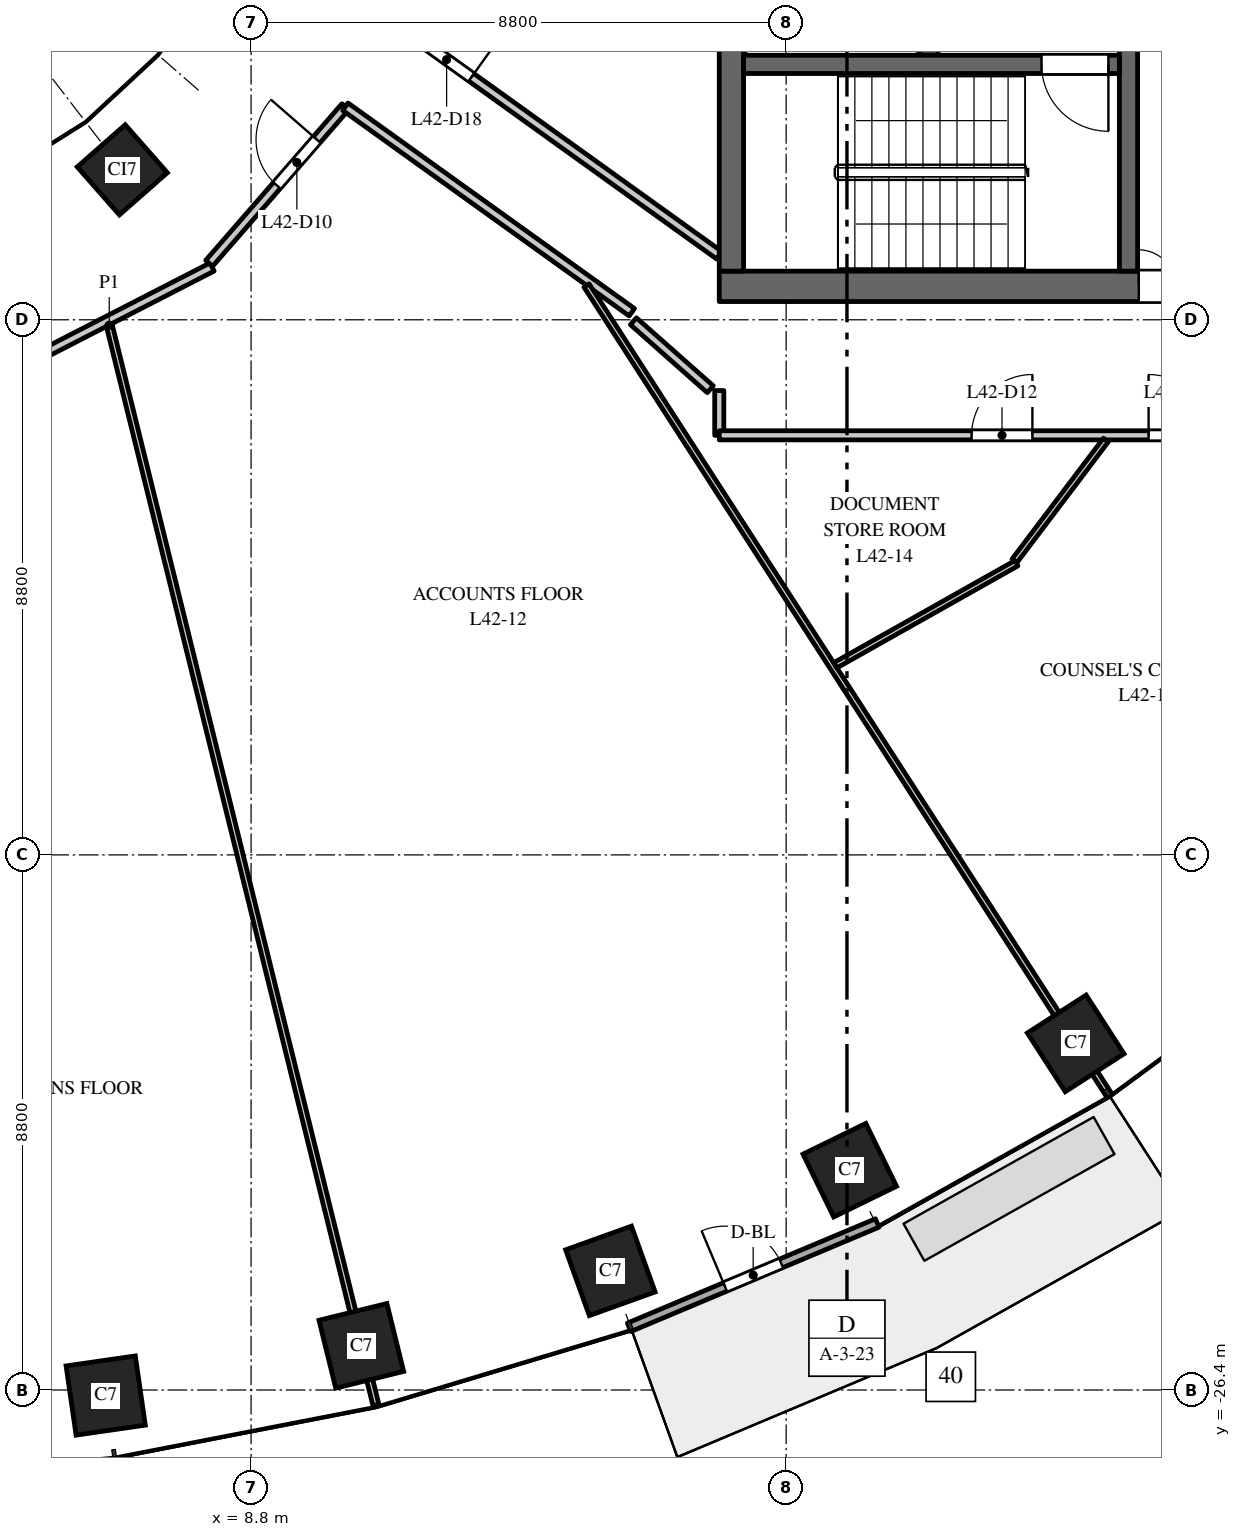
"""IFC4 building model, lengths in metres.
Left out: names, types, materials, properties, quantities, classifications, styles, units other than length and angle.
Written with IfcOpenShell. Run it as: python <this file> out.ifc"""

import sys

from ifc_helpers import new_model, si_unit, direction, frame, frame_2d, origin, origin_2d, place, context, subcontext, project, spatial, rectangle, extrude, element, fill, save


model = new_model("IFC4")
c1 = context("Model", 3, precision=1e-05, world=origin(), true_north=direction((0.0, 1.0)))
c2 = subcontext(c1, "Body", "Model", "MODEL_VIEW")
j1 = project(units=[si_unit("LENGTHUNIT", "METRE"), si_unit("PLANEANGLEUNIT", "RADIAN")], contexts=[c1])
p1 = place(None, origin())
s1 = spatial("IfcSite", under=j1, at=p1, CompositionType="ELEMENT")
p2 = place(p1, origin())
s2 = spatial("IfcBuilding", under=s1, at=p2, CompositionType="ELEMENT")
p3 = place(p2, frame((0.0, 0.0, 182.0)))
s3 = spatial("IfcBuildingStorey", under=s2, at=p3, CompositionType="ELEMENT", Elevation=182.0)
for number, where, z_axis, x_axis in (
    (1, (6.409, -26.491, 0.0), (0.0, 0.0, 1.0), (0.99, 0.143, 0.0)),
    (2, (10.613, -25.674, 0.0), (0.0, 0.0, 1.0), (0.971, 0.24, 0.0)),
    (3, (14.709, -24.441, 0.0), (0.0, 0.0, 1.0), (0.941, 0.338, 0.0)),
    (4, (18.646, -22.785, 0.0), (0.0, 0.0, 1.0), (0.898, 0.439, 0.0)),
    (5, (22.362, -20.7, 0.0), (0.0, 0.0, 1.0), (0.84, 0.542, 0.0)),
):
    element("IfcColumn", number, at=place(p3, frame(where, z_axis=z_axis, x_axis=x_axis)), inside=s3, PredefinedType="COLUMN", context=c2, shape_type="SweptSolid", body=[
        extrude(rectangle(XDim=1.15, YDim=1.15, at=origin_2d()), origin(), (0.0, 0.0, 1.0), 4.0),
    ])
p4 = place(p3, frame((6.682, -6.334, 0.0), z_axis=(0.0, 0.0, 1.0), x_axis=(0.75102249095, 0.660276622399, 0.0)))
e6 = element("IfcColumn", 6, at=p4, inside=s3, PredefinedType="COLUMN", context=c2, shape_type="SweptSolid", body=[
    extrude(rectangle(XDim=1.05, YDim=1.05, at=origin_2d()), origin(), (0.0, 0.0, 1.0), 4.0),
])
p5 = place(p3, frame((16.5, -8.25, 0.0), z_axis=(0.0, 0.0, 1.0), x_axis=(1.0, 0.0, 0.0)))
e7 = element("IfcWall", 7, at=p5, inside=s3, PredefinedType="SHEAR", context=c2, shape_type="SweptSolid", body=[
    extrude(rectangle(XDim=15.0, YDim=0.5, at=frame_2d((7.5, 0.0))), origin(), (0.0, 0.0, 1.0), 3.7),
])
p6 = place(p5, frame((6.9, 0.0, 0.0)))
e8 = element("IfcOpeningElement", 8, at=p6, cuts=e7, PredefinedType="OPENING", context=c2, shape_type="SweptSolid", body=[
    extrude(rectangle(XDim=1.2, YDim=2.1, at=frame_2d((0.6, 1.05))), frame((0.0, 0.26, 0.0), z_axis=(0.0, -1.0, 0.0), x_axis=(1.0, 0.0, 0.0)), (0.0, 0.0, 1.0), 0.52),
])
p7 = place(p5, frame((12.95, 0.0, 0.0)))
e9 = element("IfcOpeningElement", 9, at=p7, cuts=e7, PredefinedType="OPENING", context=c2, shape_type="SweptSolid", body=[
    extrude(rectangle(XDim=0.9, YDim=2.1, at=frame_2d((0.45, 1.05))), frame((0.0, 0.26, 0.0), z_axis=(0.0, -1.0, 0.0), x_axis=(1.0, 0.0, 0.0)), (0.0, 0.0, 1.0), 0.52),
])
p8 = place(p3, frame((19.95, -4.45, 0.0), z_axis=(0.0, 0.0, 1.0), x_axis=(0.0, 1.0, 0.0)))
e10 = element("IfcWall", 10, at=p8, inside=s3, PredefinedType="SHEAR", context=c2, shape_type="SweptSolid", body=[
    extrude(rectangle(XDim=8.9, YDim=0.3, at=frame_2d((4.45, 0.0))), origin(), (0.0, 0.0, 1.0), 3.7),
])
p9 = place(p8, frame((0.775, 0.0, 0.0)))
e11 = element("IfcOpeningElement", 11, at=p9, cuts=e10, PredefinedType="OPENING", context=c2, shape_type="SweptSolid", body=[
    extrude(rectangle(XDim=1.2, YDim=2.1, at=frame_2d((0.6, 1.05))), frame((0.0, 0.16, 0.0), z_axis=(0.0, -1.0, 0.0), x_axis=(1.0, 0.0, 0.0)), (0.0, 0.0, 1.0), 0.32),
])
p10 = place(p8, frame((4.675, 0.0, 0.0)))
e12 = element("IfcOpeningElement", 12, at=p10, cuts=e10, PredefinedType="OPENING", context=c2, shape_type="SweptSolid", body=[
    extrude(rectangle(XDim=1.1, YDim=2.1, at=frame_2d((0.55, 1.05))), frame((0.0, 0.16, 0.0), z_axis=(0.0, -1.0, 0.0), x_axis=(1.0, 0.0, 0.0)), (0.0, 0.0, 1.0), 0.32),
])
p11 = place(p8, frame((7.25, 0.0, 0.0)))
e13 = element("IfcOpeningElement", 13, at=p11, cuts=e10, PredefinedType="OPENING", context=c2, shape_type="SweptSolid", body=[
    extrude(rectangle(XDim=1.1, YDim=2.1, at=frame_2d((0.55, 1.05))), frame((0.0, 0.16, 0.0), z_axis=(0.0, -1.0, 0.0), x_axis=(1.0, 0.0, 0.0)), (0.0, 0.0, 1.0), 0.32),
])
p12 = place(p3, frame((16.7, -8.0, 0.0), z_axis=(0.0, 0.0, 1.0), x_axis=(0.0, 1.0, 0.0)))
e14 = element("IfcWall", 14, at=p12, inside=s3, PredefinedType="SHEAR", context=c2, shape_type="SweptSolid", body=[
    extrude(rectangle(XDim=16.0, YDim=0.4, at=frame_2d((8.0, 0.0))), origin(), (0.0, 0.0, 1.0), 3.7),
])
p13 = place(p3, frame((23.23, -8.0, 0.0), z_axis=(0.0, 0.0, 1.0), x_axis=(0.0, 1.0, 0.0)))
e15 = element("IfcWall", 15, at=p13, inside=s3, PredefinedType="SHEAR", context=c2, shape_type="SweptSolid", body=[
    extrude(rectangle(XDim=7.875, YDim=0.3, at=frame_2d((3.938, 0.0))), origin(), (0.0, 0.0, 1.0), 3.7),
])
p14 = place(p13, frame((5.15, 0.0, 0.0)))
e16 = element("IfcOpeningElement", 16, at=p14, cuts=e15, PredefinedType="OPENING", context=c2, shape_type="SweptSolid", body=[
    extrude(rectangle(XDim=1.1, YDim=2.1, at=frame_2d((0.55, 1.05))), frame((0.0, 0.16, 0.0), z_axis=(0.0, -1.0, 0.0), x_axis=(1.0, 0.0, 0.0)), (0.0, 0.0, 1.0), 0.32),
])
p15 = place(p3, frame((16.9, -4.6, 0.0), z_axis=(0.0, 0.0, 1.0), x_axis=(1.0, 0.0, 0.0)))
e17 = element("IfcWall", 17, at=p15, inside=s3, PredefinedType="SHEAR", context=c2, shape_type="SweptSolid", body=[
    extrude(rectangle(XDim=6.18, YDim=0.3, at=frame_2d((3.09, 0.0))), origin(), (0.0, 0.0, 1.0), 3.7),
])
p16 = place(p15, frame((4.9, 0.0, 0.0)))
e18 = element("IfcOpeningElement", 18, at=p16, cuts=e17, PredefinedType="OPENING", context=c2, shape_type="SweptSolid", body=[
    extrude(rectangle(XDim=1.1, YDim=2.1, at=frame_2d((0.55, 1.05))), frame((0.0, 0.16, 0.0), z_axis=(0.0, -1.0, 0.0), x_axis=(1.0, 0.0, 0.0)), (0.0, 0.0, 1.0), 0.32),
])
p17 = place(p3, frame((15.018, -25.369, 0.0), z_axis=(0.0, 0.0, 1.0), x_axis=(0.921816985161, 0.387625393736, 0.0)))
e19 = element("IfcWall", 19, at=p17, inside=s3, PredefinedType="STANDARD", context=c2, shape_type="SweptSolid", body=[
    extrude(rectangle(XDim=4.426, YDim=0.15, at=frame_2d((2.213, 0.0))), origin(), (0.0, 0.0, 1.0), 3.7),
])
p18 = place(p17, frame((1.713, 0.0, 0.0)))
e20 = element("IfcOpeningElement", 20, at=p18, cuts=e19, PredefinedType="OPENING", context=c2, shape_type="SweptSolid", body=[
    extrude(rectangle(XDim=1.0, YDim=2.4, at=frame_2d((0.5, 1.2))), frame((0.0, 0.085, 0.0), z_axis=(0.0, -1.0, 0.0), x_axis=(1.0, 0.0, 0.0)), (0.0, 0.0, 1.0), 0.17),
])
p19 = place(p3, frame((4.337, -9.896, 0.0), z_axis=(0.0, 0.0, 1.0), x_axis=(0.889382211946, 0.457164391739, 0.0)))
e21 = element("IfcWall", 21, at=p19, inside=s3, PredefinedType="PARTITIONING", context=c2, shape_type="SweptSolid", body=[
    extrude(rectangle(XDim=4.296, YDim=0.15, at=frame_2d((2.148, 0.0))), origin(), (0.0, 0.0, 1.0), 2.85),
])
p20 = place(p3, frame((6.467, -8.889, 0.0), z_axis=(0.0, 0.0, 1.0), x_axis=(0.239792865419, -0.970824073504, 0.0)))
e22 = element("IfcWall", 22, at=p20, inside=s3, PredefinedType="PARTITIONING", context=c2, shape_type="SweptSolid", body=[
    extrude(rectangle(XDim=18.291, YDim=0.1, at=frame_2d((9.146, 0.0))), origin(), (0.0, 0.0, 1.0), 2.85),
])
p21 = place(p3, frame((8.111, -7.871, 0.0), z_axis=(0.0, 0.0, 1.0), x_axis=(0.656293818527, 0.754505416656, 0.0)))
e23 = element("IfcWall", 23, at=p21, inside=s3, PredefinedType="PARTITIONING", context=c2, shape_type="SweptSolid", body=[
    extrude(rectangle(XDim=3.413, YDim=0.15, at=frame_2d((1.707, 0.0))), origin(), (0.0, 0.0, 1.0), 2.75),
])
p22 = place(p21, frame((1.697, 0.0, 0.0)))
e24 = element("IfcOpeningElement", 24, at=p22, cuts=e23, PredefinedType="OPENING", context=c2, shape_type="SweptSolid", body=[
    extrude(rectangle(XDim=1.0, YDim=2.1, at=frame_2d((0.5, 1.05))), frame((0.0, 0.085, 0.0), z_axis=(0.0, -1.0, 0.0), x_axis=(1.0, 0.0, 0.0)), (0.0, 0.0, 1.0), 0.17),
])
p23 = place(p3, frame((10.351, -5.296, 0.0), z_axis=(0.0, 0.0, 1.0), x_axis=(0.812494026232, -0.582969516645, 0.0)))
e25 = element("IfcWall", 25, at=p23, inside=s3, PredefinedType="PARTITIONING", context=c2, shape_type="SweptSolid", body=[
    extrude(rectangle(XDim=5.798, YDim=0.15, at=frame_2d((2.899, 0.0))), origin(), (0.0, 0.0, 1.0), 2.75),
])
p24 = place(p3, frame((11.203, -3.938, 0.0), z_axis=(0.0, 0.0, 1.0), x_axis=(0.812471543061, -0.583000850528, 0.0)))
e26 = element("IfcWall", 26, at=p24, inside=s3, PredefinedType="PARTITIONING", context=c2, shape_type="SweptSolid", body=[
    extrude(rectangle(XDim=6.52, YDim=0.15, at=frame_2d((3.26, 0.0))), origin(), (0.0, 0.0, 1.0), 3.7),
])
p25 = place(p24, frame((0.5, 0.0, 0.0)))
e27 = element("IfcOpeningElement", 27, at=p25, cuts=e26, PredefinedType="OPENING", context=c2, shape_type="SweptSolid", body=[
    extrude(rectangle(XDim=1.0, YDim=2.1, at=frame_2d((0.5, 1.05))), frame((0.0, 0.085, 0.0), z_axis=(0.0, -1.0, 0.0), x_axis=(1.0, 0.0, 0.0)), (0.0, 0.0, 1.0), 0.17),
])
p26 = place(p3, frame((14.317, -8.236, 0.0), z_axis=(0.0, 0.0, 1.0), x_axis=(0.542334368531, -0.840162741801, 0.0)))
e28 = element("IfcWall", 28, at=p26, inside=s3, PredefinedType="PARTITIONING", context=c2, shape_type="SweptSolid", body=[
    extrude(rectangle(XDim=15.837, YDim=0.1, at=frame_2d((7.919, 0.0))), origin(), (0.0, 0.0, 1.0), 3.7),
])
p27 = place(p3, frame((16.5, -10.7, 0.0), z_axis=(0.0, 0.0, 1.0), x_axis=(0.0, 1.0, 0.0)))
e29 = element("IfcWall", 29, at=p27, inside=s3, PredefinedType="PARTITIONING", context=c2, shape_type="SweptSolid", body=[
    extrude(rectangle(XDim=0.736, YDim=0.15, at=frame_2d((0.368, 0.0))), origin(), (0.0, 0.0, 1.0), 3.7),
])
p28 = place(p3, frame((16.5, -10.7, 0.0), z_axis=(0.0, 0.0, 1.0), x_axis=(1.0, 0.0, 0.0)))
e30 = element("IfcWall", 30, at=p28, inside=s3, PredefinedType="PARTITIONING", context=c2, shape_type="SweptSolid", body=[
    extrude(rectangle(XDim=15.0, YDim=0.15, at=frame_2d((7.5, 0.0))), origin(), (0.0, 0.0, 1.0), 2.75),
])
p29 = place(p28, frame((4.15, 0.0, 0.0)))
e31 = element("IfcOpeningElement", 31, at=p29, cuts=e30, PredefinedType="OPENING", context=c2, shape_type="SweptSolid", body=[
    extrude(rectangle(XDim=1.0, YDim=2.1, at=frame_2d((0.5, 1.05))), frame((0.0, 0.085, 0.0), z_axis=(0.0, -1.0, 0.0), x_axis=(1.0, 0.0, 0.0)), (0.0, 0.0, 1.0), 0.17),
])
p30 = place(p28, frame((7.061, 0.0, 0.0)))
e32 = element("IfcOpeningElement", 32, at=p30, cuts=e30, PredefinedType="OPENING", context=c2, shape_type="SweptSolid", body=[
    extrude(rectangle(XDim=1.0, YDim=2.1, at=frame_2d((0.5, 1.05))), frame((0.0, 0.085, 0.0), z_axis=(0.0, -1.0, 0.0), x_axis=(1.0, 0.0, 0.0)), (0.0, 0.0, 1.0), 0.17),
])
p31 = place(p3, frame((18.409, -14.482, 0.0), z_axis=(0.0, 0.0, 1.0), x_axis=(0.871167200766, 0.490986464487, 0.0)))
e33 = element("IfcWall", 33, at=p31, inside=s3, PredefinedType="PARTITIONING", context=c2, shape_type="SweptSolid", body=[
    extrude(rectangle(XDim=3.419, YDim=0.1, at=frame_2d((1.71, 0.0))), origin(), (0.0, 0.0, 1.0), 3.7),
])
p32 = place(p3, frame((21.355, -12.765, 0.0), z_axis=(0.0, 0.0, 1.0), x_axis=(0.603287715996, 0.797523624558, 0.0)))
e34 = element("IfcWall", 34, at=p32, inside=s3, PredefinedType="PARTITIONING", context=c2, shape_type="SweptSolid", body=[
    extrude(rectangle(XDim=2.491, YDim=0.1, at=frame_2d((1.246, 0.0))), origin(), (0.0, 0.0, 1.0), 2.75),
])
p33 = place(p3, frame((16.352, -9.942, 0.0), z_axis=(0.0, 0.0, 1.0), x_axis=(-0.749107006374, 0.662449011624, 0.0)))
e35 = element("IfcWall", 35, at=p33, inside=s3, PredefinedType="PARTITIONING", context=c2, shape_type="SweptSolid", body=[
    extrude(rectangle(XDim=1.688, YDim=0.15, at=frame_2d((0.844, 0.0))), origin(), (0.0, 0.0, 1.0), 3.7),
])
p34 = place(p16, origin())
e36 = element("IfcDoor", 36, at=p34, inside=s3, OperationType="SINGLE_SWING_RIGHT", PredefinedType="DOOR", context=c2, shape_type="SweptSolid", body=[
    extrude(rectangle(XDim=1.1, YDim=2.1, at=frame_2d((0.55, 1.05))), frame((0.0, 0.025, 0.0), z_axis=(0.0, -1.0, 0.0), x_axis=(1.0, 0.0, 0.0)), (0.0, 0.0, 1.0), 0.05),
])
fill(e18, e36)
p35 = place(p6, origin())
e37 = element("IfcDoor", 37, at=p35, inside=s3, OperationType="DOUBLE_DOOR_DOUBLE_SWING", PredefinedType="DOOR", context=c2, shape_type="SweptSolid", body=[
    extrude(rectangle(XDim=1.2, YDim=2.1, at=frame_2d((0.6, 1.05))), frame((0.0, 0.025, 0.0), z_axis=(0.0, -1.0, 0.0), x_axis=(1.0, 0.0, 0.0)), (0.0, 0.0, 1.0), 0.05),
])
fill(e8, e37)
p36 = place(p18, origin())
e38 = element("IfcDoor", 38, at=p36, inside=s3, OperationType="SINGLE_SWING_LEFT", PredefinedType="DOOR", context=c2, shape_type="SweptSolid", body=[
    extrude(rectangle(XDim=1.0, YDim=2.4, at=frame_2d((0.5, 1.2))), frame((0.0, 0.025, 0.0), z_axis=(0.0, -1.0, 0.0), x_axis=(1.0, 0.0, 0.0)), (0.0, 0.0, 1.0), 0.05),
])
fill(e20, e38)
p37 = place(p22, origin())
e39 = element("IfcDoor", 39, at=p37, inside=s3, OperationType="SINGLE_SWING_RIGHT", PredefinedType="DOOR", context=c2, shape_type="SweptSolid", body=[
    extrude(rectangle(XDim=1.0, YDim=2.1, at=frame_2d((0.5, 1.05))), frame((0.0, 0.025, 0.0), z_axis=(0.0, -1.0, 0.0), x_axis=(1.0, 0.0, 0.0)), (0.0, 0.0, 1.0), 0.05),
])
fill(e24, e39)
p38 = place(p29, origin())
e40 = element("IfcDoor", 40, at=p38, inside=s3, OperationType="SINGLE_SWING_RIGHT", PredefinedType="DOOR", context=c2, shape_type="SweptSolid", body=[
    extrude(rectangle(XDim=1.0, YDim=2.1, at=frame_2d((0.5, 1.05))), frame((0.0, 0.025, 0.0), z_axis=(0.0, -1.0, 0.0), x_axis=(1.0, 0.0, 0.0)), (0.0, 0.0, 1.0), 0.05),
])
fill(e31, e40)
p39 = place(p30, origin())
e41 = element("IfcDoor", 41, at=p39, inside=s3, OperationType="SINGLE_SWING_LEFT", PredefinedType="DOOR", context=c2, shape_type="SweptSolid", body=[
    extrude(rectangle(XDim=1.0, YDim=2.1, at=frame_2d((0.5, 1.05))), frame((0.0, 0.025, 0.0), z_axis=(0.0, -1.0, 0.0), x_axis=(1.0, 0.0, 0.0)), (0.0, 0.0, 1.0), 0.05),
])
fill(e32, e41)
p40 = place(p25, origin())
e42 = element("IfcDoor", 42, at=p40, inside=s3, OperationType="SINGLE_SWING_RIGHT", PredefinedType="DOOR", context=c2, shape_type="SweptSolid", body=[
    extrude(rectangle(XDim=1.0, YDim=2.1, at=frame_2d((0.5, 1.05))), frame((0.0, 0.025, 0.0), z_axis=(0.0, -1.0, 0.0), x_axis=(1.0, 0.0, 0.0)), (0.0, 0.0, 1.0), 0.05),
])
fill(e27, e42)
save(model, sys.argv[1])
